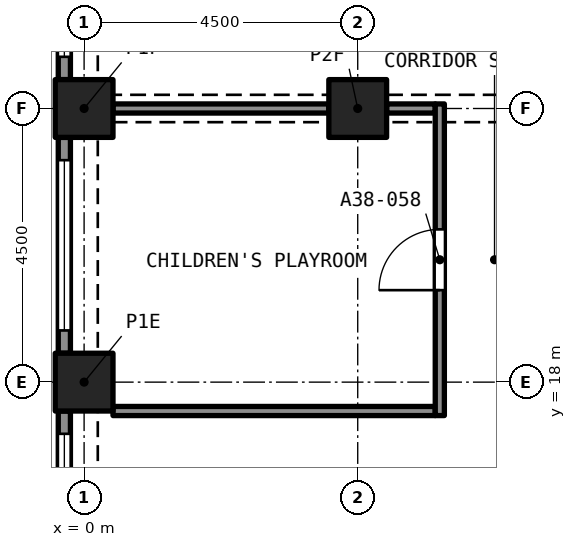
"""IFC4 building model, lengths in metres.
Left out: names, types, materials, properties, quantities, classifications, styles, units other than length and angle.
Written with IfcOpenShell. Run it as: python <this file> out.ifc"""

import sys

from ifc_helpers import new_model, si_unit, direction, frame, frame_2d, origin, origin_2d, place, context, subcontext, project, spatial, rectangle, extrude, element, fill, save


model = new_model("IFC4")
c1 = context("Model", 3, precision=1e-05, world=origin(), true_north=direction((0.0, 1.0)))
c2 = subcontext(c1, "Body", "Model", "MODEL_VIEW")
j1 = project(units=[si_unit("LENGTHUNIT", "METRE"), si_unit("PLANEANGLEUNIT", "RADIAN")], contexts=[c1])
p1 = place(None, origin())
s1 = spatial("IfcSite", under=j1, at=p1, CompositionType="ELEMENT")
p2 = place(p1, origin())
s2 = spatial("IfcBuilding", under=s1, at=p2, CompositionType="ELEMENT")
p3 = place(p2, frame((0.0, 0.0, 136.6)))
s3 = spatial("IfcBuildingStorey", under=s2, at=p3, CompositionType="ELEMENT", Elevation=136.6)
for number, where, z_axis, x_axis in (
    (1, (0.0, 18.0, 0.0), (0.0, 0.0, 1.0), (1.0, 0.0, 0.0)),
    (2, (0.0, 22.5, 0.0), (0.0, 0.0, 1.0), (1.0, 0.0, 0.0)),
    (3, (4.5, 22.5, 0.0), (0.0, 0.0, 1.0), (1.0, 0.0, 0.0)),
):
    element("IfcColumn", number, at=place(p3, frame(where, z_axis=z_axis, x_axis=x_axis)), inside=s3, PredefinedType="COLUMN", context=c2, shape_type="SweptSolid", body=[
        extrude(rectangle(XDim=0.95, YDim=0.95, at=origin_2d()), origin(), (0.0, 0.0, 1.0), 3.2),
    ])
p4 = place(p3, frame((-0.325, 22.975, 0.0), z_axis=(0.0, 0.0, 1.0), x_axis=(0.0, 1.0, 0.0)))
e4 = element("IfcWall", 4, at=p4, inside=s3, PredefinedType="SOLIDWALL", context=c2, shape_type="SweptSolid", body=[
    extrude(rectangle(XDim=3.55, YDim=0.2, at=frame_2d((1.775, 0.0))), origin(), (0.0, 0.0, 1.0), 3.2),
])
p5 = place(p4, frame((0.375, 0.0, 0.45)))
e5 = element("IfcOpeningElement", 5, at=p5, cuts=e4, PredefinedType="OPENING", context=c2, shape_type="SweptSolid", body=[
    extrude(rectangle(XDim=2.8, YDim=1.95, at=frame_2d((1.4, 0.975))), frame((0.0, 0.11, 0.0), z_axis=(0.0, -1.0, 0.0), x_axis=(1.0, 0.0, 0.0)), (0.0, 0.0, 1.0), 0.22),
])
p6 = place(p3, frame((-0.325, 18.475, 0.0), z_axis=(0.0, 0.0, 1.0), x_axis=(0.0, 1.0, 0.0)))
e6 = element("IfcWall", 6, at=p6, inside=s3, PredefinedType="SOLIDWALL", context=c2, shape_type="SweptSolid", body=[
    extrude(rectangle(XDim=3.55, YDim=0.2, at=frame_2d((1.775, 0.0))), origin(), (0.0, 0.0, 1.0), 3.2),
])
p7 = place(p6, frame((0.375, 0.0, 0.45)))
e7 = element("IfcOpeningElement", 7, at=p7, cuts=e6, PredefinedType="OPENING", context=c2, shape_type="SweptSolid", body=[
    extrude(rectangle(XDim=2.8, YDim=1.95, at=frame_2d((1.4, 0.975))), frame((0.0, 0.11, 0.0), z_axis=(0.0, -1.0, 0.0), x_axis=(1.0, 0.0, 0.0)), (0.0, 0.0, 1.0), 0.22),
])
p8 = place(p3, frame((-0.325, 13.975, 0.0), z_axis=(0.0, 0.0, 1.0), x_axis=(0.0, 1.0, 0.0)))
e8 = element("IfcWall", 8, at=p8, inside=s3, PredefinedType="SOLIDWALL", context=c2, shape_type="SweptSolid", body=[
    extrude(rectangle(XDim=3.55, YDim=0.2, at=frame_2d((1.775, 0.0))), origin(), (0.0, 0.0, 1.0), 3.2),
])
p9 = place(p8, frame((0.375, 0.0, 0.45)))
e9 = element("IfcOpeningElement", 9, at=p9, cuts=e8, PredefinedType="OPENING", context=c2, shape_type="SweptSolid", body=[
    extrude(rectangle(XDim=2.8, YDim=1.95, at=frame_2d((1.4, 0.975))), frame((0.0, 0.11, 0.0), z_axis=(0.0, -1.0, 0.0), x_axis=(1.0, 0.0, 0.0)), (0.0, 0.0, 1.0), 0.22),
])
p10 = place(p3, frame((0.475, 17.525, 0.0), z_axis=(0.0, 0.0, 1.0), x_axis=(1.0, 0.0, 0.0)))
e10 = element("IfcWall", 10, at=p10, inside=s3, PredefinedType="PARTITIONING", context=c2, shape_type="SweptSolid", body=[
    extrude(rectangle(XDim=5.3, YDim=0.15, at=frame_2d((2.65, 0.0))), origin(), (0.0, 0.0, 1.0), 2.9),
])
p11 = place(p3, frame((4.975, 22.5, 0.0), z_axis=(0.0, 0.0, 1.0), x_axis=(1.0, 0.0, 0.0)))
e11 = element("IfcWall", 11, at=p11, inside=s3, PredefinedType="PARTITIONING", context=c2, shape_type="SweptSolid", body=[
    extrude(rectangle(XDim=0.8, YDim=0.15, at=frame_2d((0.4, 0.0))), origin(), (0.0, 0.0, 1.0), 2.38),
])
p12 = place(p3, frame((0.475, 22.5, 0.0), z_axis=(0.0, 0.0, 1.0), x_axis=(1.0, 0.0, 0.0)))
e12 = element("IfcWall", 12, at=p12, inside=s3, PredefinedType="PARTITIONING", context=c2, shape_type="SweptSolid", body=[
    extrude(rectangle(XDim=3.55, YDim=0.15, at=frame_2d((1.775, 0.0))), origin(), (0.0, 0.0, 1.0), 2.38),
])
p13 = place(p3, frame((5.85, 17.45, 0.0), z_axis=(0.0, 0.0, 1.0), x_axis=(0.0, 1.0, 0.0)))
e13 = element("IfcWall", 13, at=p13, inside=s3, PredefinedType="PARTITIONING", context=c2, shape_type="SweptSolid", body=[
    extrude(rectangle(XDim=5.125, YDim=0.15, at=frame_2d((2.562, 0.0))), origin(), (0.0, 0.0, 1.0), 2.9),
])
p14 = place(p13, frame((2.062, 0.0, 0.0)))
e14 = element("IfcOpeningElement", 14, at=p14, cuts=e13, PredefinedType="OPENING", context=c2, shape_type="SweptSolid", body=[
    extrude(rectangle(XDim=1.0, YDim=2.1, at=frame_2d((0.5, 1.05))), frame((0.0, 0.085, 0.0), z_axis=(0.0, -1.0, 0.0), x_axis=(1.0, 0.0, 0.0)), (0.0, 0.0, 1.0), 0.17),
])
p15 = place(p5, origin())
e15 = element("IfcWindow", 15, at=p15, inside=s3, PartitioningType="SINGLE_PANEL", PredefinedType="WINDOW", context=c2, shape_type="SweptSolid", body=[
    extrude(rectangle(XDim=2.8, YDim=1.95, at=frame_2d((1.4, 0.975))), frame((0.0, 0.03, 0.0), z_axis=(0.0, -1.0, 0.0), x_axis=(1.0, 0.0, 0.0)), (0.0, 0.0, 1.0), 0.06),
])
fill(e5, e15)
p16 = place(p7, origin())
e16 = element("IfcWindow", 16, at=p16, inside=s3, PartitioningType="SINGLE_PANEL", PredefinedType="WINDOW", context=c2, shape_type="SweptSolid", body=[
    extrude(rectangle(XDim=2.8, YDim=1.95, at=frame_2d((1.4, 0.975))), frame((0.0, 0.03, 0.0), z_axis=(0.0, -1.0, 0.0), x_axis=(1.0, 0.0, 0.0)), (0.0, 0.0, 1.0), 0.06),
])
fill(e7, e16)
p17 = place(p9, origin())
e17 = element("IfcWindow", 17, at=p17, inside=s3, PartitioningType="SINGLE_PANEL", PredefinedType="WINDOW", context=c2, shape_type="SweptSolid", body=[
    extrude(rectangle(XDim=2.8, YDim=1.95, at=frame_2d((1.4, 0.975))), frame((0.0, 0.03, 0.0), z_axis=(0.0, -1.0, 0.0), x_axis=(1.0, 0.0, 0.0)), (0.0, 0.0, 1.0), 0.06),
])
fill(e9, e17)
p18 = place(p14, origin())
e18 = element("IfcDoor", 18, at=p18, inside=s3, OperationType="SINGLE_SWING_RIGHT", PredefinedType="DOOR", context=c2, shape_type="SweptSolid", body=[
    extrude(rectangle(XDim=1.0, YDim=2.1, at=frame_2d((0.5, 1.05))), frame((0.0, 0.025, 0.0), z_axis=(0.0, -1.0, 0.0), x_axis=(1.0, 0.0, 0.0)), (0.0, 0.0, 1.0), 0.05),
])
fill(e14, e18)
save(model, sys.argv[1])
